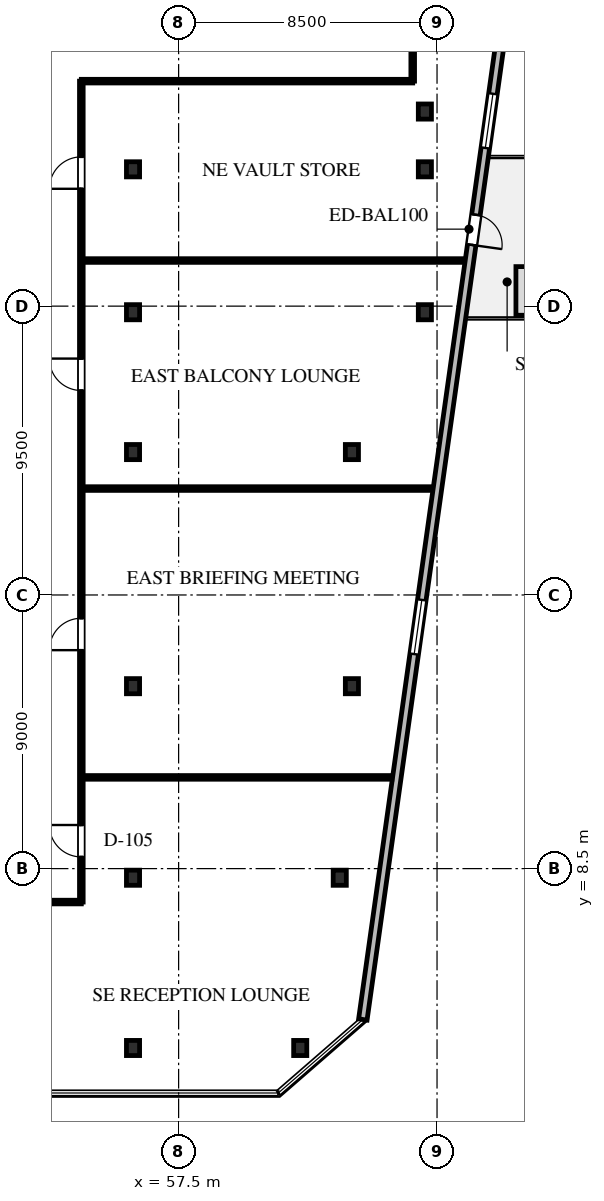
"""IFC4 building model, lengths in metres.
Left out: names, types, materials, properties, quantities, classifications, styles, units other than length and angle.
Written with IfcOpenShell. Run it as: python <this file> out.ifc"""

import sys

from ifc_helpers import new_model, si_unit, direction, frame, frame_2d, origin, origin_2d, place, context, subcontext, project, spatial, rectangle, i_section, extrude, element, fill, save


model = new_model("IFC4")
c1 = context("Model", 3, precision=1e-05, world=origin(), true_north=direction((0.0, 1.0)))
c2 = subcontext(c1, "Body", "Model", "MODEL_VIEW")
j1 = project(units=[si_unit("LENGTHUNIT", "METRE"), si_unit("PLANEANGLEUNIT", "RADIAN")], contexts=[c1])
p1 = place(None, origin())
s1 = spatial("IfcSite", under=j1, at=p1, CompositionType="ELEMENT")
p2 = place(p1, origin())
s2 = spatial("IfcBuilding", under=s1, at=p2, CompositionType="ELEMENT")
p3 = place(p2, frame((0.0, 0.0, 69.5)))
s3 = spatial("IfcBuildingStorey", under=s2, at=p3, CompositionType="ELEMENT", Elevation=69.5)
for number, where, z_axis, x_axis in (
    (1, (56.0, 14.5, 0.0), (0.0, 0.0, 1.0), (1.0, 0.0, 0.0)),
    (2, (63.2, 14.5, 0.0), (0.0, 0.0, 1.0), (1.0, 0.0, 0.0)),
    (3, (56.0, 22.2, 0.0), (0.0, 0.0, 1.0), (1.0, 0.0, 0.0)),
    (4, (63.2, 22.2, 0.0), (0.0, 0.0, 1.0), (1.0, 0.0, 0.0)),
    (5, (56.0, 26.8, 0.0), (0.0, 0.0, 1.0), (1.0, 0.0, 0.0)),
    (6, (65.6, 26.8, 0.0), (0.0, 0.0, 1.0), (1.0, 0.0, 0.0)),
    (7, (56.0, 31.5, 0.0), (0.0, 0.0, 1.0), (1.0, 0.0, 0.0)),
    (8, (65.6, 31.5, 0.0), (0.0, 0.0, 1.0), (1.0, 0.0, 0.0)),
    (9, (56.0, 2.6, 0.0), (0.0, 0.0, 1.0), (1.0, 0.0, 0.0)),
    (10, (61.5, 2.6, 0.0), (0.0, 0.0, 1.0), (1.0, 0.0, 0.0)),
    (11, (56.0, 8.2, 0.0), (0.0, 0.0, 1.0), (1.0, 0.0, 0.0)),
    (12, (62.8, 8.2, 0.0), (0.0, 0.0, 1.0), (1.0, 0.0, 0.0)),
    (13, (65.6, 33.4, 0.0), (0.0, 0.0, 1.0), (1.0, 0.0, 0.0)),
):
    element("IfcColumn", number, at=place(p3, frame(where, z_axis=z_axis, x_axis=x_axis)), inside=s3, PredefinedType="COLUMN", context=c2, shape_type="SweptSolid", body=[
        extrude(i_section(OverallWidth=0.432, OverallDepth=0.498, WebThickness=0.056, FlangeThickness=0.089, FilletRadius=0.03, at=origin_2d()), origin(), (0.0, 0.0, 1.0), 4.0),
    ])
p4 = place(p3, frame((68.375, 37.8, 0.0), z_axis=(0.0, 0.0, 1.0), x_axis=(-0.139174610616, -0.990267856572, 0.0)))
e14 = element("IfcWall", 14, at=p4, inside=s3, PredefinedType="STANDARD", context=c2, shape_type="SweptSolid", body=[
    extrude(rectangle(XDim=34.6, YDim=0.28, at=frame_2d((17.3, 0.0))), origin(), (0.0, 0.0, 1.0), 3.74),
])
p5 = place(p4, frame((7.872, 0.0, 0.0)))
e15 = element("IfcOpeningElement", 15, at=p5, cuts=e14, PredefinedType="OPENING", context=c2, shape_type="SweptSolid", body=[
    extrude(rectangle(XDim=1.0, YDim=2.15, at=frame_2d((0.5, 1.075))), frame((0.0, 0.15, 0.0), z_axis=(0.0, -1.0, 0.0), x_axis=(1.0, 0.0, 0.0)), (0.0, 0.0, 1.0), 0.3),
])
p6 = place(p4, frame((3.852, 0.0, 0.65)))
e16 = element("IfcOpeningElement", 16, at=p6, cuts=e14, PredefinedType="OPENING", context=c2, shape_type="SweptSolid", body=[
    extrude(rectangle(XDim=1.8, YDim=2.1, at=frame_2d((0.9, 1.05))), frame((0.0, 0.15, 0.0), z_axis=(0.0, -1.0, 0.0), x_axis=(1.0, 0.0, 0.0)), (0.0, 0.0, 1.0), 0.3),
])
p7 = place(p4, frame((20.663, 0.0, 0.65)))
e17 = element("IfcOpeningElement", 17, at=p7, cuts=e14, PredefinedType="OPENING", context=c2, shape_type="SweptSolid", body=[
    extrude(rectangle(XDim=1.8, YDim=2.1, at=frame_2d((0.9, 1.05))), frame((0.0, 0.15, 0.0), z_axis=(0.0, -1.0, 0.0), x_axis=(1.0, 0.0, 0.0)), (0.0, 0.0, 1.0), 0.3),
])
p8 = place(p3, frame((54.3, 34.4, 0.0), z_axis=(0.0, 0.0, 1.0), x_axis=(1.0, 0.0, 0.0)))
e18 = element("IfcWall", 18, at=p8, inside=s3, PredefinedType="PARTITIONING", context=c2, shape_type="SweptSolid", body=[
    extrude(rectangle(XDim=10.9, YDim=0.12, at=frame_2d((5.45, 0.0))), origin(), (0.0, 0.0, 1.0), 2.813),
])
p9 = place(p3, frame((65.2, 34.4, 0.0), z_axis=(0.0, 0.0, 1.0), x_axis=(0.0, 1.0, 0.0)))
e19 = element("IfcWall", 19, at=p9, inside=s3, PredefinedType="PARTITIONING", context=c2, shape_type="SweptSolid", body=[
    extrude(rectangle(XDim=3.217, YDim=0.12, at=frame_2d((1.608, 0.0))), origin(), (0.0, 0.0, 1.0), 2.813),
])
p10 = place(p3, frame((54.3, 7.4, 0.0), z_axis=(0.0, 0.0, 1.0), x_axis=(0.0, 1.0, 0.0)))
e20 = element("IfcWall", 20, at=p10, inside=s3, PredefinedType="PARTITIONING", context=c2, shape_type="SweptSolid", body=[
    extrude(rectangle(XDim=27.0, YDim=0.12, at=frame_2d((13.5, 0.0))), origin(), (0.0, 0.0, 1.0), 2.813),
])
p11 = place(p10, frame((1.484, 0.0, 0.0)))
e21 = element("IfcOpeningElement", 21, at=p11, cuts=e20, PredefinedType="OPENING", context=c2, shape_type="SweptSolid", body=[
    extrude(rectangle(XDim=1.05, YDim=2.2, at=frame_2d((0.525, 1.1))), frame((0.0, 0.07, 0.0), z_axis=(0.0, -1.0, 0.0), x_axis=(1.0, 0.0, 0.0)), (0.0, 0.0, 1.0), 0.14),
])
p12 = place(p10, frame((8.285, 0.0, 0.0)))
e22 = element("IfcOpeningElement", 22, at=p12, cuts=e20, PredefinedType="OPENING", context=c2, shape_type="SweptSolid", body=[
    extrude(rectangle(XDim=1.05, YDim=2.2, at=frame_2d((0.525, 1.1))), frame((0.0, 0.07, 0.0), z_axis=(0.0, -1.0, 0.0), x_axis=(1.0, 0.0, 0.0)), (0.0, 0.0, 1.0), 0.14),
])
p13 = place(p10, frame((16.825, 0.0, 0.0)))
e23 = element("IfcOpeningElement", 23, at=p13, cuts=e20, PredefinedType="OPENING", context=c2, shape_type="SweptSolid", body=[
    extrude(rectangle(XDim=1.05, YDim=2.2, at=frame_2d((0.525, 1.1))), frame((0.0, 0.07, 0.0), z_axis=(0.0, -1.0, 0.0), x_axis=(1.0, 0.0, 0.0)), (0.0, 0.0, 1.0), 0.14),
])
p14 = place(p10, frame((23.46, 0.0, 0.0)))
e24 = element("IfcOpeningElement", 24, at=p14, cuts=e20, PredefinedType="OPENING", context=c2, shape_type="SweptSolid", body=[
    extrude(rectangle(XDim=1.05, YDim=2.2, at=frame_2d((0.525, 1.1))), frame((0.0, 0.07, 0.0), z_axis=(0.0, -1.0, 0.0), x_axis=(1.0, 0.0, 0.0)), (0.0, 0.0, 1.0), 0.14),
])
p15 = place(p3, frame((52.3, 7.4, 0.0), z_axis=(0.0, 0.0, 1.0), x_axis=(1.0, 0.0, 0.0)))
e25 = element("IfcWall", 25, at=p15, inside=s3, PredefinedType="PARTITIONING", context=c2, shape_type="SweptSolid", body=[
    extrude(rectangle(XDim=2.0, YDim=0.12, at=frame_2d((1.0, 0.0))), origin(), (0.0, 0.0, 1.0), 2.978),
])
p16 = place(p3, frame((54.368, 11.5, 0.0), z_axis=(0.0, 0.0, 1.0), x_axis=(1.0, 0.0, 0.0)))
e26 = element("IfcWall", 26, at=p16, inside=s3, PredefinedType="PARTITIONING", context=c2, shape_type="SweptSolid", body=[
    extrude(rectangle(XDim=10.144, YDim=0.12, at=frame_2d((5.072, 0.0))), origin(), (0.0, 0.0, 1.0), 2.813),
])
p17 = place(p3, frame((54.368, 21.0, 0.0), z_axis=(0.0, 0.0, 1.0), x_axis=(1.0, 0.0, 0.0)))
e27 = element("IfcWall", 27, at=p17, inside=s3, PredefinedType="PARTITIONING", context=c2, shape_type="SweptSolid", body=[
    extrude(rectangle(XDim=11.479, YDim=0.12, at=frame_2d((5.74, 0.0))), origin(), (0.0, 0.0, 1.0), 2.813),
])
p18 = place(p3, frame((54.368, 28.5, 0.0), z_axis=(0.0, 0.0, 1.0), x_axis=(1.0, 0.0, 0.0)))
e28 = element("IfcWall", 28, at=p18, inside=s3, PredefinedType="PARTITIONING", context=c2, shape_type="SweptSolid", body=[
    extrude(rectangle(XDim=12.533, YDim=0.12, at=frame_2d((6.267, 0.0))), origin(), (0.0, 0.0, 1.0), 2.813),
])
p19 = place(p5, origin())
e29 = element("IfcDoor", 29, at=p19, inside=s3, OperationType="SINGLE_SWING_RIGHT", PredefinedType="DOOR", context=c2, shape_type="SweptSolid", body=[
    extrude(rectangle(XDim=1.0, YDim=2.15, at=frame_2d((0.5, 1.075))), frame((0.0, 0.025, 0.0), z_axis=(0.0, -1.0, 0.0), x_axis=(1.0, 0.0, 0.0)), (0.0, 0.0, 1.0), 0.05),
])
fill(e15, e29)
p20 = place(p6, origin())
e30 = element("IfcWindow", 30, at=p20, inside=s3, PartitioningType="SINGLE_PANEL", PredefinedType="WINDOW", context=c2, shape_type="SweptSolid", body=[
    extrude(rectangle(XDim=1.8, YDim=2.1, at=frame_2d((0.9, 1.05))), frame((0.0, 0.03, 0.0), z_axis=(0.0, -1.0, 0.0), x_axis=(1.0, 0.0, 0.0)), (0.0, 0.0, 1.0), 0.06),
])
fill(e16, e30)
p21 = place(p7, origin())
e31 = element("IfcWindow", 31, at=p21, inside=s3, PartitioningType="SINGLE_PANEL", PredefinedType="WINDOW", context=c2, shape_type="SweptSolid", body=[
    extrude(rectangle(XDim=1.8, YDim=2.1, at=frame_2d((0.9, 1.05))), frame((0.0, 0.03, 0.0), z_axis=(0.0, -1.0, 0.0), x_axis=(1.0, 0.0, 0.0)), (0.0, 0.0, 1.0), 0.06),
])
fill(e17, e31)
p22 = place(p11, origin())
e32 = element("IfcDoor", 32, at=p22, inside=s3, OperationType="SINGLE_SWING_RIGHT", PredefinedType="DOOR", context=c2, shape_type="SweptSolid", body=[
    extrude(rectangle(XDim=1.05, YDim=2.2, at=frame_2d((0.525, 1.1))), frame((0.0, 0.025, 0.0), z_axis=(0.0, -1.0, 0.0), x_axis=(1.0, 0.0, 0.0)), (0.0, 0.0, 1.0), 0.05),
])
fill(e21, e32)
p23 = place(p12, origin())
e33 = element("IfcDoor", 33, at=p23, inside=s3, OperationType="SINGLE_SWING_LEFT", PredefinedType="DOOR", context=c2, shape_type="SweptSolid", body=[
    extrude(rectangle(XDim=1.05, YDim=2.2, at=frame_2d((0.525, 1.1))), frame((0.0, 0.025, 0.0), z_axis=(0.0, -1.0, 0.0), x_axis=(1.0, 0.0, 0.0)), (0.0, 0.0, 1.0), 0.05),
])
fill(e22, e33)
p24 = place(p13, origin())
e34 = element("IfcDoor", 34, at=p24, inside=s3, OperationType="SINGLE_SWING_RIGHT", PredefinedType="DOOR", context=c2, shape_type="SweptSolid", body=[
    extrude(rectangle(XDim=1.05, YDim=2.2, at=frame_2d((0.525, 1.1))), frame((0.0, 0.025, 0.0), z_axis=(0.0, -1.0, 0.0), x_axis=(1.0, 0.0, 0.0)), (0.0, 0.0, 1.0), 0.05),
])
fill(e23, e34)
p25 = place(p14, origin())
e35 = element("IfcDoor", 35, at=p25, inside=s3, OperationType="SINGLE_SWING_LEFT", PredefinedType="DOOR", context=c2, shape_type="SweptSolid", body=[
    extrude(rectangle(XDim=1.05, YDim=2.2, at=frame_2d((0.525, 1.1))), frame((0.0, 0.025, 0.0), z_axis=(0.0, -1.0, 0.0), x_axis=(1.0, 0.0, 0.0)), (0.0, 0.0, 1.0), 0.05),
])
fill(e24, e35)
save(model, sys.argv[1])
